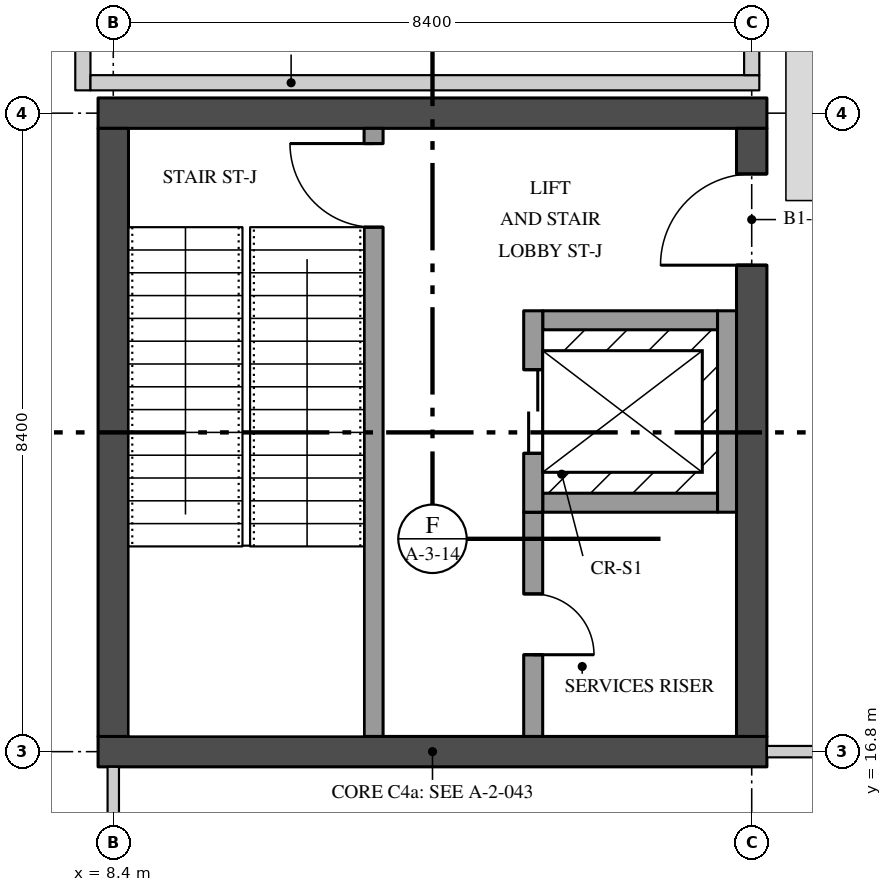
"""IFC4 building model, lengths in metres.
Left out: names, types, materials, properties, quantities, classifications, styles, units other than length and angle.
Written with IfcOpenShell. Run it as: python <this file> out.ifc"""

import sys

from ifc_helpers import new_model, si_unit, direction, frame, frame_2d, origin, place, context, subcontext, project, spatial, rectangle, extrude, element, fill, save


model = new_model("IFC4")
c1 = context("Model", 3, precision=1e-05, world=origin(), true_north=direction((0.0, 1.0)))
c2 = subcontext(c1, "Body", "Model", "MODEL_VIEW")
j1 = project(units=[si_unit("LENGTHUNIT", "METRE"), si_unit("PLANEANGLEUNIT", "RADIAN")], contexts=[c1])
p1 = place(None, origin())
s1 = spatial("IfcSite", under=j1, at=p1, CompositionType="ELEMENT")
p2 = place(p1, origin())
s2 = spatial("IfcBuilding", under=s1, at=p2, CompositionType="ELEMENT")
p3 = place(p2, frame((0.0, 0.0, -4.5)))
s3 = spatial("IfcBuildingStorey", under=s2, at=p3, CompositionType="ELEMENT", Elevation=-4.5)
for number, where, z_axis, x_axis in (
    (1, (8.2, 16.8, 0.0), (0.0, 0.0, 1.0), (1.0, 0.0, 0.0)),
    (2, (8.2, 25.2, 0.0), (0.0, 0.0, 1.0), (1.0, 0.0, 0.0)),
):
    element("IfcWall", number, at=place(p3, frame(where, z_axis=z_axis, x_axis=x_axis)), inside=s3, PredefinedType="SHEAR", context=c2, shape_type="SweptSolid", body=[
        extrude(rectangle(XDim=8.8, YDim=0.4, at=frame_2d((4.4, 0.0))), origin(), (0.0, 0.0, 1.0), 4.05),
    ])
p4 = place(p3, frame((8.4, 17.0, 0.0), z_axis=(0.0, 0.0, 1.0), x_axis=(0.0, 1.0, 0.0)))
e3 = element("IfcWall", 3, at=p4, inside=s3, PredefinedType="SHEAR", context=c2, shape_type="SweptSolid", body=[
    extrude(rectangle(XDim=8.0, YDim=0.4, at=frame_2d((4.0, 0.0))), origin(), (0.0, 0.0, 1.0), 4.05),
])
p5 = place(p3, frame((16.8, 17.0, 0.0), z_axis=(0.0, 0.0, 1.0), x_axis=(0.0, 1.0, 0.0)))
e4 = element("IfcWall", 4, at=p5, inside=s3, PredefinedType="SHEAR", context=c2, shape_type="SweptSolid", body=[
    extrude(rectangle(XDim=8.0, YDim=0.4, at=frame_2d((4.0, 0.0))), origin(), (0.0, 0.0, 1.0), 4.05),
])
p6 = place(p5, frame((6.2, 0.0, 0.0)))
e5 = element("IfcOpeningElement", 5, at=p6, cuts=e4, PredefinedType="OPENING", context=c2, shape_type="SweptSolid", body=[
    extrude(rectangle(XDim=1.2, YDim=2.1, at=frame_2d((0.6, 1.05))), frame((0.0, 0.21, 0.0), z_axis=(0.0, -1.0, 0.0), x_axis=(1.0, 0.0, 0.0)), (0.0, 0.0, 1.0), 0.42),
])
p7 = place(p3, frame((11.825, 25.0, 0.0), z_axis=(0.0, 0.0, 1.0), x_axis=(0.0, -1.0, 0.0)))
e6 = element("IfcWall", 6, at=p7, inside=s3, PredefinedType="SOLIDWALL", context=c2, shape_type="SweptSolid", body=[
    extrude(rectangle(XDim=8.0, YDim=0.25, at=frame_2d((4.0, 0.0))), origin(), (0.0, 0.0, 1.0), 4.05),
])
p8 = place(p7, frame((0.2, 0.0, 0.0)))
e7 = element("IfcOpeningElement", 7, at=p8, cuts=e6, PredefinedType="OPENING", context=c2, shape_type="SweptSolid", body=[
    extrude(rectangle(XDim=1.1, YDim=2.1, at=frame_2d((0.55, 1.05))), frame((0.0, 0.135, 0.0), z_axis=(0.0, -1.0, 0.0), x_axis=(1.0, 0.0, 0.0)), (0.0, 0.0, 1.0), 0.27),
])
p9 = place(p3, frame((13.925, 19.95, 0.0), z_axis=(0.0, 0.0, 1.0), x_axis=(0.0, -1.0, 0.0)))
e8 = element("IfcWall", 8, at=p9, inside=s3, PredefinedType="SOLIDWALL", context=c2, shape_type="SweptSolid", body=[
    extrude(rectangle(XDim=2.95, YDim=0.25, at=frame_2d((1.475, 0.0))), origin(), (0.0, 0.0, 1.0), 4.05),
])
p10 = place(p9, frame((1.075, 0.0, 0.0)))
e9 = element("IfcOpeningElement", 9, at=p10, cuts=e8, PredefinedType="OPENING", context=c2, shape_type="SweptSolid", body=[
    extrude(rectangle(XDim=0.8, YDim=2.1, at=frame_2d((0.4, 1.05))), frame((0.0, 0.135, 0.0), z_axis=(0.0, -1.0, 0.0), x_axis=(1.0, 0.0, 0.0)), (0.0, 0.0, 1.0), 0.27),
])
p11 = place(p3, frame((16.475, 19.95, 0.0), z_axis=(0.0, 0.0, 1.0), x_axis=(0.0, 1.0, 0.0)))
e10 = element("IfcWall", 10, at=p11, inside=s3, PredefinedType="SOLIDWALL", context=c2, shape_type="SweptSolid", body=[
    extrude(rectangle(XDim=2.65, YDim=0.25, at=frame_2d((1.325, 0.0))), origin(), (0.0, 0.0, 1.0), 4.05),
])
for number, where, z_axis, x_axis in (
    (11, (14.05, 22.475, 0.0), (0.0, 0.0, 1.0), (1.0, 0.0, 0.0)),
    (12, (14.05, 20.075, 0.0), (0.0, 0.0, 1.0), (1.0, 0.0, 0.0)),
):
    element("IfcWall", number, at=place(p3, frame(where, z_axis=z_axis, x_axis=x_axis)), inside=s3, PredefinedType="SOLIDWALL", context=c2, shape_type="SweptSolid", body=[
        extrude(rectangle(XDim=2.3, YDim=0.25, at=frame_2d((1.15, 0.0))), origin(), (0.0, 0.0, 1.0), 4.05),
    ])
p12 = place(p3, frame((13.925, 19.95, 0.0), z_axis=(0.0, 0.0, 1.0), x_axis=(0.0, 1.0, 0.0)))
e13 = element("IfcWall", 13, at=p12, inside=s3, PredefinedType="SOLIDWALL", context=c2, shape_type="SweptSolid", body=[
    extrude(rectangle(XDim=2.65, YDim=0.25, at=frame_2d((1.325, 0.0))), origin(), (0.0, 0.0, 1.0), 4.05),
])
p13 = place(p12, frame((0.775, 0.0, 0.0)))
e14 = element("IfcOpeningElement", 14, at=p13, cuts=e13, PredefinedType="OPENING", context=c2, shape_type="SweptSolid", body=[
    extrude(rectangle(XDim=1.1, YDim=2.1, at=frame_2d((0.55, 1.05))), frame((0.0, 0.135, 0.0), z_axis=(0.0, -1.0, 0.0), x_axis=(1.0, 0.0, 0.0)), (0.0, 0.0, 1.0), 0.27),
])
p14 = place(p3, frame((8.4, 8.8, 0.0), z_axis=(0.0, 0.0, 1.0), x_axis=(0.0, 1.0, 0.0)))
e15 = element("IfcWall", 15, at=p14, inside=s3, PredefinedType="PARTITIONING", context=c2, shape_type="SweptSolid", body=[
    extrude(rectangle(XDim=7.8, YDim=0.15, at=frame_2d((3.9, 0.0))), origin(), (0.0, 0.0, 1.0), 4.05),
])
p15 = place(p3, frame((17.0, 16.8, 0.0), z_axis=(0.0, 0.0, 1.0), x_axis=(1.0, 0.0, 0.0)))
e16 = element("IfcWall", 16, at=p15, inside=s3, PredefinedType="PARTITIONING", context=c2, shape_type="SweptSolid", body=[
    extrude(rectangle(XDim=7.8, YDim=0.15, at=frame_2d((3.9, 0.0))), origin(), (0.0, 0.0, 1.0), 4.05),
])
p16 = place(p15, frame((3.4, 0.0, 0.0)))
e17 = element("IfcOpeningElement", 17, at=p16, cuts=e16, PredefinedType="OPENING", context=c2, shape_type="SweptSolid", body=[
    extrude(rectangle(XDim=1.2, YDim=2.1, at=frame_2d((0.6, 1.05))), frame((0.0, 0.085, 0.0), z_axis=(0.0, -1.0, 0.0), x_axis=(1.0, 0.0, 0.0)), (0.0, 0.0, 1.0), 0.17),
])
p17 = place(p3, frame((8.0, 25.5, 0.0), z_axis=(0.0, 0.0, 1.0), x_axis=(0.0, 1.0, 0.0)))
e18 = element("IfcWall", 18, at=p17, inside=s3, PredefinedType="PARTITIONING", context=c2, shape_type="SweptSolid", body=[
    extrude(rectangle(XDim=7.65, YDim=0.2, at=frame_2d((3.825, 0.0))), origin(), (0.0, 0.0, 1.0), 4.05),
])
p18 = place(p3, frame((8.1, 25.6, 0.0), z_axis=(0.0, 0.0, 1.0), x_axis=(1.0, 0.0, 0.0)))
e19 = element("IfcWall", 19, at=p18, inside=s3, PredefinedType="PARTITIONING", context=c2, shape_type="SweptSolid", body=[
    extrude(rectangle(XDim=8.8, YDim=0.2, at=frame_2d((4.4, 0.0))), origin(), (0.0, 0.0, 1.0), 4.05),
])
p19 = place(p3, frame((16.8, 25.7, 0.0), z_axis=(0.0, 0.0, 1.0), x_axis=(0.0, 1.0, 0.0)))
e20 = element("IfcWall", 20, at=p19, inside=s3, PredefinedType="PARTITIONING", context=c2, shape_type="SweptSolid", body=[
    extrude(rectangle(XDim=7.7, YDim=0.2, at=frame_2d((3.85, 0.0))), origin(), (0.0, 0.0, 1.0), 4.05),
])
p20 = place(p19, frame((3.8, 0.0, 0.0)))
e21 = element("IfcOpeningElement", 21, at=p20, cuts=e20, PredefinedType="OPENING", context=c2, shape_type="SweptSolid", body=[
    extrude(rectangle(XDim=1.0, YDim=2.1, at=frame_2d((0.5, 1.05))), frame((0.0, 0.11, 0.0), z_axis=(0.0, -1.0, 0.0), x_axis=(1.0, 0.0, 0.0)), (0.0, 0.0, 1.0), 0.22),
])
p21 = place(p6, origin())
e22 = element("IfcDoor", 22, at=p21, inside=s3, OperationType="SINGLE_SWING_RIGHT", PredefinedType="DOOR", context=c2, shape_type="SweptSolid", body=[
    extrude(rectangle(XDim=1.2, YDim=2.1, at=frame_2d((0.6, 1.05))), frame((0.0, 0.035, 0.0), z_axis=(0.0, -1.0, 0.0), x_axis=(1.0, 0.0, 0.0)), (0.0, 0.0, 1.0), 0.07),
])
fill(e5, e22)
p22 = place(p10, origin())
e23 = element("IfcDoor", 23, at=p22, inside=s3, OperationType="SINGLE_SWING_LEFT", PredefinedType="DOOR", context=c2, shape_type="SweptSolid", body=[
    extrude(rectangle(XDim=0.8, YDim=2.1, at=frame_2d((0.4, 1.05))), frame((0.0, 0.035, 0.0), z_axis=(0.0, -1.0, 0.0), x_axis=(1.0, 0.0, 0.0)), (0.0, 0.0, 1.0), 0.07),
])
fill(e9, e23)
p23 = place(p8, frame((1.1, 0.0, 0.0), z_axis=(0.0, 0.0, 1.0), x_axis=(-1.0, 0.0, 0.0)))
e24 = element("IfcDoor", 24, at=p23, inside=s3, OperationType="SINGLE_SWING_LEFT", PredefinedType="DOOR", context=c2, shape_type="SweptSolid", body=[
    extrude(rectangle(XDim=1.1, YDim=2.1, at=frame_2d((0.55, 1.05))), frame((0.0, 0.035, 0.0), z_axis=(0.0, -1.0, 0.0), x_axis=(1.0, 0.0, 0.0)), (0.0, 0.0, 1.0), 0.07),
])
fill(e7, e24)
p24 = place(p13, origin())
e25 = element("IfcDoor", 25, at=p24, inside=s3, OperationType="DOUBLE_DOOR_SLIDING", PredefinedType="DOOR", context=c2, shape_type="SweptSolid", body=[
    extrude(rectangle(XDim=1.1, YDim=2.1, at=frame_2d((0.55, 1.05))), frame((0.0, 0.04, 0.0), z_axis=(0.0, -1.0, 0.0), x_axis=(1.0, 0.0, 0.0)), (0.0, 0.0, 1.0), 0.08),
])
fill(e14, e25)
save(model, sys.argv[1])
